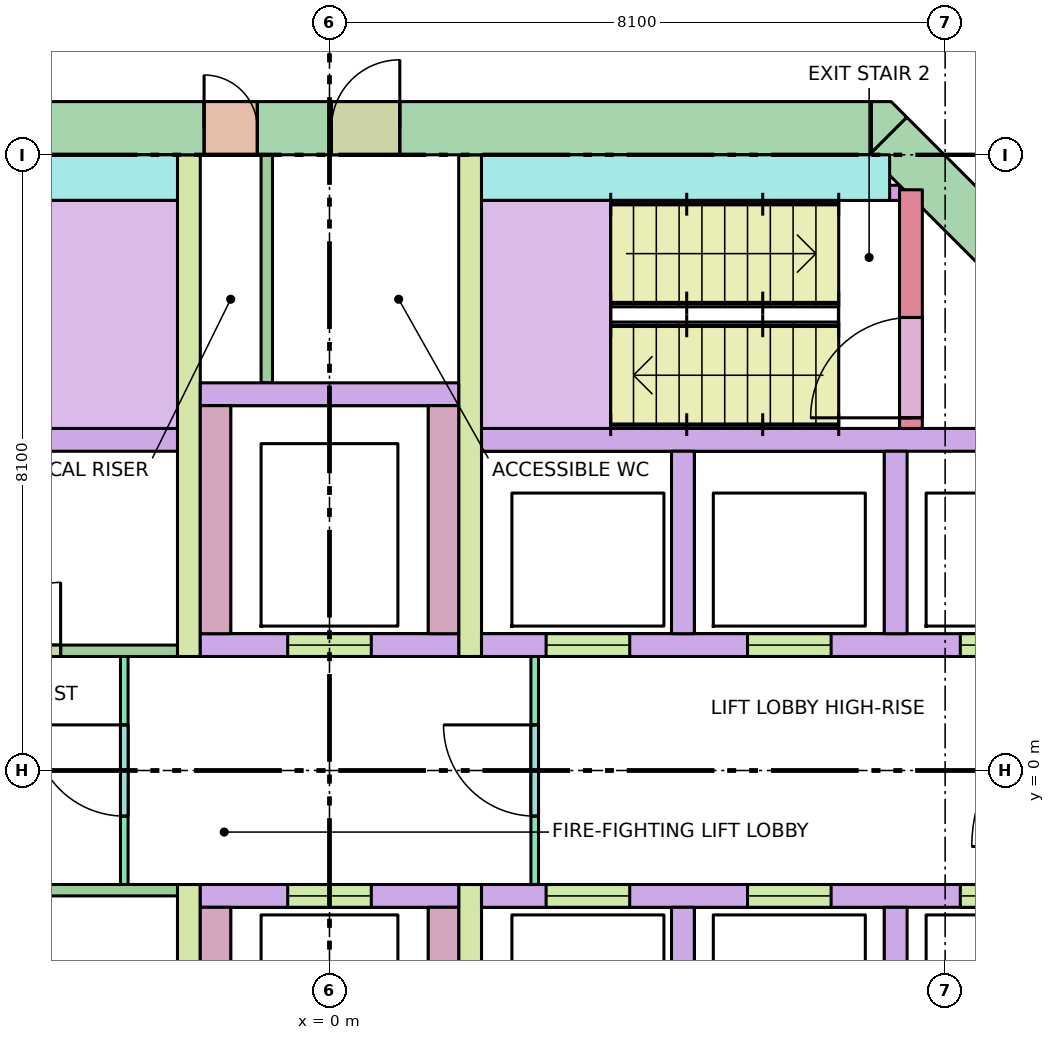
"""IFC4 building model, lengths in metres.
Left out: names, types, materials, properties, quantities, classifications, styles, units other than length and angle.
Written with IfcOpenShell. Run it as: python <this file> out.ifc"""

import sys

from ifc_helpers import new_model, si_unit, direction, frame, frame_2d, origin, place, context, subcontext, project, spatial, polyline, rectangle, outline, extrude, element, fill, save


model = new_model("IFC4")
c1 = context("Model", 3, precision=1e-05, world=origin(), true_north=direction((0.0, 1.0)))
c2 = subcontext(c1, "Body", "Model", "MODEL_VIEW")
j1 = project(units=[si_unit("LENGTHUNIT", "METRE"), si_unit("PLANEANGLEUNIT", "RADIAN")], contexts=[c1])
p1 = place(None, origin())
s1 = spatial("IfcSite", under=j1, at=p1, CompositionType="ELEMENT")
p2 = place(p1, origin())
s2 = spatial("IfcBuilding", under=s1, at=p2, CompositionType="ELEMENT")
p3 = place(p2, frame((0.0, 0.0, 237.2)))
s3 = spatial("IfcBuildingStorey", under=s2, at=p3, CompositionType="ELEMENT", Elevation=237.2)
p4 = place(p3, frame((-7.13, 8.45, -0.28), z_axis=(0.0, 0.0, 1.0), x_axis=(1.0, 0.0, 0.0)))
e1 = element("IfcWall", 1, at=p4, inside=s3, PredefinedType="SHEAR", context=c2, shape_type="SweptSolid", body=[
    extrude(rectangle(XDim=14.26, YDim=0.7, at=frame_2d((7.13, 0.0))), origin(), (0.0, 0.0, 1.0), 3.7),
])
p5 = place(p4, frame((5.48, 0.0, 0.28)))
e2 = element("IfcOpeningElement", 2, at=p5, cuts=e1, PredefinedType="OPENING", context=c2, shape_type="SweptSolid", body=[
    extrude(rectangle(XDim=0.7, YDim=2.1, at=frame_2d((0.35, 1.05))), frame((0.0, 0.36, 0.0), z_axis=(0.0, -1.0, 0.0), x_axis=(1.0, 0.0, 0.0)), (0.0, 0.0, 1.0), 0.72),
])
p6 = place(p4, frame((7.155, 0.0, 0.28)))
e3 = element("IfcOpeningElement", 3, at=p6, cuts=e1, PredefinedType="OPENING", context=c2, shape_type="SweptSolid", body=[
    extrude(rectangle(XDim=0.9, YDim=2.1, at=frame_2d((0.45, 1.05))), frame((0.0, 0.36, 0.0), z_axis=(0.0, -1.0, 0.0), x_axis=(1.0, 0.0, 0.0)), (0.0, 0.0, 1.0), 0.72),
])
p7 = place(p3, frame((7.347, 8.347, -0.28), z_axis=(0.0, 0.0, 1.0), x_axis=(0.707106781187, -0.707106781187, 0.0)))
e4 = element("IfcWall", 4, at=p7, inside=s3, PredefinedType="SHEAR", context=c2, shape_type="SweptSolid", body=[
    extrude(rectangle(XDim=4.243, YDim=0.7, at=frame_2d((2.121, 0.0))), origin(), (0.0, 0.0, 1.0), 3.7),
])
p8 = place(p7, frame((2.393, 0.0, 0.28)))
e5 = element("IfcOpeningElement", 5, at=p8, cuts=e4, PredefinedType="OPENING", context=c2, shape_type="SweptSolid", body=[
    extrude(rectangle(XDim=1.2, YDim=2.1, at=frame_2d((0.6, 1.05))), frame((0.0, 0.36, 0.0), z_axis=(0.0, -1.0, 0.0), x_axis=(1.0, 0.0, 0.0)), (0.0, 0.0, 1.0), 0.72),
])
p9 = place(p3, frame((0.0, 0.0, -0.28)))
e6 = element("IfcWall", 6, at=p9, inside=s3, PredefinedType="SHEAR", context=c2, shape_type="SweptSolid", body=[
    extrude(outline(polyline([(7.39, 8.8), (7.595, 8.595), (7.595, 8.595), (7.595, 8.595), (7.13, 8.13), (7.13, 8.8), (7.13, 8.8), (7.39, 8.8)])), origin(), (0.0, 0.0, 1.0), 3.7),
])
for number, where, z_axis, x_axis in (
    (7, (-10.1, 4.35, 0.0), (0.0, 0.0, 1.0), (1.0, 0.0, 0.0)),
    (8, (2.0, 4.35, 0.0), (0.0, 0.0, 1.0), (1.0, 0.0, 0.0)),
):
    element("IfcWall", number, at=place(p3, frame(where, z_axis=z_axis, x_axis=x_axis)), inside=s3, PredefinedType="SOLIDWALL", context=c2, shape_type="SweptSolid", body=[
        extrude(rectangle(XDim=8.1, YDim=0.3, at=frame_2d((4.05, 0.0))), origin(), (0.0, 0.0, 1.0), 3.42),
    ])
p10 = place(p3, frame((2.0, 1.65, 0.0), z_axis=(0.0, 0.0, 1.0), x_axis=(1.0, 0.0, 0.0)))
e9 = element("IfcWall", 9, at=p10, inside=s3, PredefinedType="SOLIDWALL", context=c2, shape_type="SweptSolid", body=[
    extrude(rectangle(XDim=8.1, YDim=0.3, at=frame_2d((4.05, 0.0))), origin(), (0.0, 0.0, 1.0), 3.42),
])
p11 = place(p10, frame((0.85, 0.0, 0.0)))
e10 = element("IfcOpeningElement", 10, at=p11, cuts=e9, PredefinedType="OPENING", context=c2, shape_type="SweptSolid", body=[
    extrude(rectangle(XDim=1.1, YDim=2.1, at=frame_2d((0.55, 1.05))), frame((0.0, 0.16, 0.0), z_axis=(0.0, -1.0, 0.0), x_axis=(1.0, 0.0, 0.0)), (0.0, 0.0, 1.0), 0.32),
])
p12 = place(p10, frame((3.5, 0.0, 0.0)))
e11 = element("IfcOpeningElement", 11, at=p12, cuts=e9, PredefinedType="OPENING", context=c2, shape_type="SweptSolid", body=[
    extrude(rectangle(XDim=1.1, YDim=2.1, at=frame_2d((0.55, 1.05))), frame((0.0, 0.16, 0.0), z_axis=(0.0, -1.0, 0.0), x_axis=(1.0, 0.0, 0.0)), (0.0, 0.0, 1.0), 0.32),
])
p13 = place(p10, frame((6.3, 0.0, 0.0)))
e12 = element("IfcOpeningElement", 12, at=p13, cuts=e9, PredefinedType="OPENING", context=c2, shape_type="SweptSolid", body=[
    extrude(rectangle(XDim=1.1, YDim=2.1, at=frame_2d((0.55, 1.05))), frame((0.0, 0.16, 0.0), z_axis=(0.0, -1.0, 0.0), x_axis=(1.0, 0.0, 0.0)), (0.0, 0.0, 1.0), 0.32),
])
p14 = place(p3, frame((2.0, -1.65, 0.0), z_axis=(0.0, 0.0, 1.0), x_axis=(1.0, 0.0, 0.0)))
e13 = element("IfcWall", 13, at=p14, inside=s3, PredefinedType="SOLIDWALL", context=c2, shape_type="SweptSolid", body=[
    extrude(rectangle(XDim=8.1, YDim=0.3, at=frame_2d((4.05, 0.0))), origin(), (0.0, 0.0, 1.0), 3.42),
])
p15 = place(p14, frame((0.85, 0.0, 0.0)))
e14 = element("IfcOpeningElement", 14, at=p15, cuts=e13, PredefinedType="OPENING", context=c2, shape_type="SweptSolid", body=[
    extrude(rectangle(XDim=1.1, YDim=2.1, at=frame_2d((0.55, 1.05))), frame((0.0, 0.16, 0.0), z_axis=(0.0, -1.0, 0.0), x_axis=(1.0, 0.0, 0.0)), (0.0, 0.0, 1.0), 0.32),
])
p16 = place(p14, frame((3.5, 0.0, 0.0)))
e15 = element("IfcOpeningElement", 15, at=p16, cuts=e13, PredefinedType="OPENING", context=c2, shape_type="SweptSolid", body=[
    extrude(rectangle(XDim=1.1, YDim=2.1, at=frame_2d((0.55, 1.05))), frame((0.0, 0.16, 0.0), z_axis=(0.0, -1.0, 0.0), x_axis=(1.0, 0.0, 0.0)), (0.0, 0.0, 1.0), 0.32),
])
p17 = place(p14, frame((6.3, 0.0, 0.0)))
e16 = element("IfcOpeningElement", 16, at=p17, cuts=e13, PredefinedType="OPENING", context=c2, shape_type="SweptSolid", body=[
    extrude(rectangle(XDim=1.1, YDim=2.1, at=frame_2d((0.55, 1.05))), frame((0.0, 0.16, 0.0), z_axis=(0.0, -1.0, 0.0), x_axis=(1.0, 0.0, 0.0)), (0.0, 0.0, 1.0), 0.32),
])
for number, where, z_axis, x_axis in (
    (17, (4.65, 1.8, 0.0), (0.0, 0.0, 1.0), (0.0, 1.0, 0.0)),
    (18, (4.65, -4.2, 0.0), (0.0, 0.0, 1.0), (0.0, 1.0, 0.0)),
    (19, (7.45, 1.8, 0.0), (0.0, 0.0, 1.0), (0.0, 1.0, 0.0)),
    (20, (7.45, -4.2, 0.0), (0.0, 0.0, 1.0), (0.0, 1.0, 0.0)),
):
    element("IfcWall", number, at=place(p3, frame(where, z_axis=z_axis, x_axis=x_axis)), inside=s3, PredefinedType="SOLIDWALL", context=c2, shape_type="SweptSolid", body=[
        extrude(rectangle(XDim=2.4, YDim=0.3, at=frame_2d((1.2, 0.0))), origin(), (0.0, 0.0, 1.0), 3.42),
    ])
for number, where, z_axis, x_axis in (
    (21, (-1.85, 1.5, 0.0), (0.0, 0.0, 1.0), (0.0, 1.0, 0.0)),
    (22, (-1.85, -8.1, 0.0), (0.0, 0.0, 1.0), (0.0, 1.0, 0.0)),
    (23, (1.85, 1.5, 0.0), (0.0, 0.0, 1.0), (0.0, 1.0, 0.0)),
    (24, (1.85, -8.1, 0.0), (0.0, 0.0, 1.0), (0.0, 1.0, 0.0)),
):
    element("IfcWall", number, at=place(p3, frame(where, z_axis=z_axis, x_axis=x_axis)), inside=s3, PredefinedType="SHEAR", context=c2, shape_type="SweptSolid", body=[
        extrude(rectangle(XDim=6.6, YDim=0.3, at=frame_2d((3.3, 0.0))), origin(), (0.0, 0.0, 1.0), 3.42),
    ])
p18 = place(p3, frame((-1.7, 1.65, 0.0), z_axis=(0.0, 0.0, 1.0), x_axis=(1.0, 0.0, 0.0)))
e25 = element("IfcWall", 25, at=p18, inside=s3, PredefinedType="SOLIDWALL", context=c2, shape_type="SweptSolid", body=[
    extrude(rectangle(XDim=3.4, YDim=0.3, at=frame_2d((1.7, 0.0))), origin(), (0.0, 0.0, 1.0), 3.42),
])
p19 = place(p18, frame((1.15, 0.0, 0.0)))
e26 = element("IfcOpeningElement", 26, at=p19, cuts=e25, PredefinedType="OPENING", context=c2, shape_type="SweptSolid", body=[
    extrude(rectangle(XDim=1.1, YDim=2.1, at=frame_2d((0.55, 1.05))), frame((0.0, 0.16, 0.0), z_axis=(0.0, -1.0, 0.0), x_axis=(1.0, 0.0, 0.0)), (0.0, 0.0, 1.0), 0.32),
])
p20 = place(p3, frame((-1.7, -1.65, 0.0), z_axis=(0.0, 0.0, 1.0), x_axis=(1.0, 0.0, 0.0)))
e27 = element("IfcWall", 27, at=p20, inside=s3, PredefinedType="SOLIDWALL", context=c2, shape_type="SweptSolid", body=[
    extrude(rectangle(XDim=3.4, YDim=0.3, at=frame_2d((1.7, 0.0))), origin(), (0.0, 0.0, 1.0), 3.42),
])
p21 = place(p20, frame((1.15, 0.0, 0.0)))
e28 = element("IfcOpeningElement", 28, at=p21, cuts=e27, PredefinedType="OPENING", context=c2, shape_type="SweptSolid", body=[
    extrude(rectangle(XDim=1.1, YDim=2.1, at=frame_2d((0.55, 1.05))), frame((0.0, 0.16, 0.0), z_axis=(0.0, -1.0, 0.0), x_axis=(1.0, 0.0, 0.0)), (0.0, 0.0, 1.0), 0.32),
])
for number, where, z_axis, x_axis in (
    (29, (-1.5, 1.8, 0.0), (0.0, 0.0, 1.0), (0.0, 1.0, 0.0)),
    (30, (-1.5, -4.8, 0.0), (0.0, 0.0, 1.0), (0.0, 1.0, 0.0)),
    (31, (1.5, 1.8, 0.0), (0.0, 0.0, 1.0), (0.0, 1.0, 0.0)),
    (32, (1.5, -4.8, 0.0), (0.0, 0.0, 1.0), (0.0, 1.0, 0.0)),
):
    element("IfcWall", number, at=place(p3, frame(where, z_axis=z_axis, x_axis=x_axis)), inside=s3, PredefinedType="SOLIDWALL", context=c2, shape_type="SweptSolid", body=[
        extrude(rectangle(XDim=3.0, YDim=0.4, at=frame_2d((1.5, 0.0))), origin(), (0.0, 0.0, 1.0), 3.42),
    ])
p22 = place(p3, frame((-1.7, 4.95, 0.0), z_axis=(0.0, 0.0, 1.0), x_axis=(1.0, 0.0, 0.0)))
e33 = element("IfcWall", 33, at=p22, inside=s3, PredefinedType="SOLIDWALL", context=c2, shape_type="SweptSolid", body=[
    extrude(rectangle(XDim=3.4, YDim=0.3, at=frame_2d((1.7, 0.0))), origin(), (0.0, 0.0, 1.0), 3.42),
])
p23 = place(p3, frame((-7.37, 7.8, 0.0), z_axis=(0.0, 0.0, 1.0), x_axis=(1.0, 0.0, 0.0)))
e34 = element("IfcWall", 34, at=p23, inside=s3, PredefinedType="SHEAR", context=c2, shape_type="SweptSolid", body=[
    extrude(rectangle(XDim=5.37, YDim=0.6, at=frame_2d((2.685, 0.0))), origin(), (0.0, 0.0, 1.0), 3.42),
])
p24 = place(p3, frame((7.65, 4.5, 0.0), z_axis=(0.0, 0.0, 1.0), x_axis=(0.0, 1.0, 0.0)))
e35 = element("IfcWall", 35, at=p24, inside=s3, PredefinedType="SHEAR", context=c2, shape_type="SweptSolid", body=[
    extrude(rectangle(XDim=3.14, YDim=0.3, at=frame_2d((1.57, 0.0))), origin(), (0.0, 0.0, 1.0), 3.42),
])
p25 = place(p24, frame((0.14, 0.0, 0.0)))
e36 = element("IfcOpeningElement", 36, at=p25, cuts=e35, PredefinedType="OPENING", context=c2, shape_type="SweptSolid", body=[
    extrude(rectangle(XDim=1.32, YDim=2.1, at=frame_2d((0.66, 1.05))), frame((0.0, 0.16, 0.0), z_axis=(0.0, -1.0, 0.0), x_axis=(1.0, 0.0, 0.0)), (0.0, 0.0, 1.0), 0.32),
])
p26 = place(p3, frame((2.0, 7.8, 0.0), z_axis=(0.0, 0.0, 1.0), x_axis=(1.0, 0.0, 0.0)))
e37 = element("IfcWall", 37, at=p26, inside=s3, PredefinedType="SHEAR", context=c2, shape_type="SweptSolid", body=[
    extrude(rectangle(XDim=5.37, YDim=0.6, at=frame_2d((2.685, 0.0))), origin(), (0.0, 0.0, 1.0), 3.42),
])
p27 = place(p3, frame((6.9, 7.6, 0.0), z_axis=(0.0, 0.0, 1.0), x_axis=(1.0, 0.0, 0.0)))
e38 = element("IfcWall", 38, at=p27, inside=s3, PredefinedType="SHEAR", context=c2, shape_type="SweptSolid", body=[
    extrude(rectangle(XDim=0.6, YDim=0.2, at=frame_2d((0.3, 0.0))), origin(), (0.0, 0.0, 1.0), 3.42),
])
p28 = place(p3, frame((-2.7, -1.5, 0.0), z_axis=(0.0, 0.0, 1.0), x_axis=(0.0, 1.0, 0.0)))
e39 = element("IfcWall", 39, at=p28, inside=s3, PredefinedType="PARTITIONING", context=c2, shape_type="SweptSolid", body=[
    extrude(rectangle(XDim=3.0, YDim=0.1, at=frame_2d((1.5, 0.0))), origin(), (0.0, 0.0, 1.0), 3.42),
])
p29 = place(p28, frame((0.9, 0.0, 0.0)))
e40 = element("IfcOpeningElement", 40, at=p29, cuts=e39, PredefinedType="OPENING", context=c2, shape_type="SweptSolid", body=[
    extrude(rectangle(XDim=1.2, YDim=2.1, at=frame_2d((0.6, 1.05))), frame((0.0, 0.06, 0.0), z_axis=(0.0, -1.0, 0.0), x_axis=(1.0, 0.0, 0.0)), (0.0, 0.0, 1.0), 0.12),
])
p30 = place(p3, frame((2.7, -1.5, 0.0), z_axis=(0.0, 0.0, 1.0), x_axis=(0.0, 1.0, 0.0)))
e41 = element("IfcWall", 41, at=p30, inside=s3, PredefinedType="PARTITIONING", context=c2, shape_type="SweptSolid", body=[
    extrude(rectangle(XDim=3.0, YDim=0.1, at=frame_2d((1.5, 0.0))), origin(), (0.0, 0.0, 1.0), 3.42),
])
p31 = place(p30, frame((0.9, 0.0, 0.0)))
e42 = element("IfcOpeningElement", 42, at=p31, cuts=e41, PredefinedType="OPENING", context=c2, shape_type="SweptSolid", body=[
    extrude(rectangle(XDim=1.2, YDim=2.1, at=frame_2d((0.6, 1.05))), frame((0.0, 0.06, 0.0), z_axis=(0.0, -1.0, 0.0), x_axis=(1.0, 0.0, 0.0)), (0.0, 0.0, 1.0), 0.12),
])
p32 = place(p3, frame((-0.825, 5.1, 0.0), z_axis=(0.0, 0.0, 1.0), x_axis=(0.0, 1.0, 0.0)))
e43 = element("IfcWall", 43, at=p32, inside=s3, PredefinedType="PARTITIONING", context=c2, shape_type="SweptSolid", body=[
    extrude(rectangle(XDim=3.0, YDim=0.15, at=frame_2d((1.5, 0.0))), origin(), (0.0, 0.0, 1.0), 3.42),
])
p33 = place(p3, frame((-10.1, 1.575, 0.0), z_axis=(0.0, 0.0, 1.0), x_axis=(1.0, 0.0, 0.0)))
e44 = element("IfcWall", 44, at=p33, inside=s3, PredefinedType="PARTITIONING", context=c2, shape_type="SweptSolid", body=[
    extrude(rectangle(XDim=8.1, YDim=0.15, at=frame_2d((4.05, 0.0))), origin(), (0.0, 0.0, 1.0), 3.42),
])
p34 = place(p33, frame((1.538, 0.0, 0.0)))
e45 = element("IfcOpeningElement", 45, at=p34, cuts=e44, PredefinedType="OPENING", context=c2, shape_type="SweptSolid", body=[
    extrude(rectangle(XDim=0.9, YDim=2.1, at=frame_2d((0.45, 1.05))), frame((0.0, 0.085, 0.0), z_axis=(0.0, -1.0, 0.0), x_axis=(1.0, 0.0, 0.0)), (0.0, 0.0, 1.0), 0.17),
])
p35 = place(p33, frame((5.663, 0.0, 0.0)))
e46 = element("IfcOpeningElement", 46, at=p35, cuts=e44, PredefinedType="OPENING", context=c2, shape_type="SweptSolid", body=[
    extrude(rectangle(XDim=0.9, YDim=2.1, at=frame_2d((0.45, 1.05))), frame((0.0, 0.085, 0.0), z_axis=(0.0, -1.0, 0.0), x_axis=(1.0, 0.0, 0.0)), (0.0, 0.0, 1.0), 0.17),
])
p36 = place(p3, frame((-10.1, -1.575, 0.0), z_axis=(0.0, 0.0, 1.0), x_axis=(1.0, 0.0, 0.0)))
e47 = element("IfcWall", 47, at=p36, inside=s3, PredefinedType="PARTITIONING", context=c2, shape_type="SweptSolid", body=[
    extrude(rectangle(XDim=8.1, YDim=0.15, at=frame_2d((4.05, 0.0))), origin(), (0.0, 0.0, 1.0), 3.42),
])
p37 = place(p36, frame((0.33, 0.0, 0.0)))
e48 = element("IfcOpeningElement", 48, at=p37, cuts=e47, PredefinedType="OPENING", context=c2, shape_type="SweptSolid", body=[
    extrude(rectangle(XDim=0.9, YDim=2.1, at=frame_2d((0.45, 1.05))), frame((0.0, 0.085, 0.0), z_axis=(0.0, -1.0, 0.0), x_axis=(1.0, 0.0, 0.0)), (0.0, 0.0, 1.0), 0.17),
])
p38 = place(p36, frame((2.04, 0.0, 0.0)))
e49 = element("IfcOpeningElement", 49, at=p38, cuts=e47, PredefinedType="OPENING", context=c2, shape_type="SweptSolid", body=[
    extrude(rectangle(XDim=0.9, YDim=2.1, at=frame_2d((0.45, 1.05))), frame((0.0, 0.085, 0.0), z_axis=(0.0, -1.0, 0.0), x_axis=(1.0, 0.0, 0.0)), (0.0, 0.0, 1.0), 0.17),
])
p39 = place(p36, frame((5.31, 0.0, 0.0)))
e50 = element("IfcOpeningElement", 50, at=p39, cuts=e47, PredefinedType="OPENING", context=c2, shape_type="SweptSolid", body=[
    extrude(rectangle(XDim=0.9, YDim=2.1, at=frame_2d((0.45, 1.05))), frame((0.0, 0.085, 0.0), z_axis=(0.0, -1.0, 0.0), x_axis=(1.0, 0.0, 0.0)), (0.0, 0.0, 1.0), 0.17),
])
p40 = place(p3, frame((8.204, 10.638, 0.0), z_axis=(0.0, 0.0, 1.0), x_axis=(0.707106781187, -0.707106781187, 0.0)))
e51 = element("IfcWall", 51, at=p40, inside=s3, PredefinedType="PARTITIONING", context=c2, shape_type="SweptSolid", body=[
    extrude(rectangle(XDim=6.271, YDim=0.15, at=frame_2d((3.135, 0.0))), origin(), (0.0, 0.0, 1.0), 2.57),
])
p41 = place(p40, frame((0.436, 0.0, 0.0)))
e52 = element("IfcOpeningElement", 52, at=p41, cuts=e51, PredefinedType="OPENING", context=c2, shape_type="SweptSolid", body=[
    extrude(rectangle(XDim=0.9, YDim=2.1, at=frame_2d((0.45, 1.05))), frame((0.0, 0.085, 0.0), z_axis=(0.0, -1.0, 0.0), x_axis=(1.0, 0.0, 0.0)), (0.0, 0.0, 1.0), 0.17),
])
p42 = place(p11, origin())
e53 = element("IfcDoor", 53, at=p42, inside=s3, OperationType="DOUBLE_DOOR_SLIDING", PredefinedType="DOOR", context=c2, shape_type="SweptSolid", body=[
    extrude(rectangle(XDim=1.1, YDim=2.1, at=frame_2d((0.55, 1.05))), frame((0.0, 0.025, 0.0), z_axis=(0.0, -1.0, 0.0), x_axis=(1.0, 0.0, 0.0)), (0.0, 0.0, 1.0), 0.05),
])
fill(e10, e53)
p43 = place(p12, origin())
e54 = element("IfcDoor", 54, at=p43, inside=s3, OperationType="DOUBLE_DOOR_SLIDING", PredefinedType="DOOR", context=c2, shape_type="SweptSolid", body=[
    extrude(rectangle(XDim=1.1, YDim=2.1, at=frame_2d((0.55, 1.05))), frame((0.0, 0.025, 0.0), z_axis=(0.0, -1.0, 0.0), x_axis=(1.0, 0.0, 0.0)), (0.0, 0.0, 1.0), 0.05),
])
fill(e11, e54)
p44 = place(p13, origin())
e55 = element("IfcDoor", 55, at=p44, inside=s3, OperationType="DOUBLE_DOOR_SLIDING", PredefinedType="DOOR", context=c2, shape_type="SweptSolid", body=[
    extrude(rectangle(XDim=1.1, YDim=2.1, at=frame_2d((0.55, 1.05))), frame((0.0, 0.025, 0.0), z_axis=(0.0, -1.0, 0.0), x_axis=(1.0, 0.0, 0.0)), (0.0, 0.0, 1.0), 0.05),
])
fill(e12, e55)
p45 = place(p15, origin())
e56 = element("IfcDoor", 56, at=p45, inside=s3, OperationType="DOUBLE_DOOR_SLIDING", PredefinedType="DOOR", context=c2, shape_type="SweptSolid", body=[
    extrude(rectangle(XDim=1.1, YDim=2.1, at=frame_2d((0.55, 1.05))), frame((0.0, 0.025, 0.0), z_axis=(0.0, -1.0, 0.0), x_axis=(1.0, 0.0, 0.0)), (0.0, 0.0, 1.0), 0.05),
])
fill(e14, e56)
p46 = place(p16, origin())
e57 = element("IfcDoor", 57, at=p46, inside=s3, OperationType="DOUBLE_DOOR_SLIDING", PredefinedType="DOOR", context=c2, shape_type="SweptSolid", body=[
    extrude(rectangle(XDim=1.1, YDim=2.1, at=frame_2d((0.55, 1.05))), frame((0.0, 0.025, 0.0), z_axis=(0.0, -1.0, 0.0), x_axis=(1.0, 0.0, 0.0)), (0.0, 0.0, 1.0), 0.05),
])
fill(e15, e57)
p47 = place(p17, origin())
e58 = element("IfcDoor", 58, at=p47, inside=s3, OperationType="DOUBLE_DOOR_SLIDING", PredefinedType="DOOR", context=c2, shape_type="SweptSolid", body=[
    extrude(rectangle(XDim=1.1, YDim=2.1, at=frame_2d((0.55, 1.05))), frame((0.0, 0.025, 0.0), z_axis=(0.0, -1.0, 0.0), x_axis=(1.0, 0.0, 0.0)), (0.0, 0.0, 1.0), 0.05),
])
fill(e16, e58)
p48 = place(p19, origin())
e59 = element("IfcDoor", 59, at=p48, inside=s3, OperationType="DOUBLE_DOOR_SLIDING", PredefinedType="DOOR", context=c2, shape_type="SweptSolid", body=[
    extrude(rectangle(XDim=1.1, YDim=2.1, at=frame_2d((0.55, 1.05))), frame((0.0, 0.025, 0.0), z_axis=(0.0, -1.0, 0.0), x_axis=(1.0, 0.0, 0.0)), (0.0, 0.0, 1.0), 0.05),
])
fill(e26, e59)
p49 = place(p21, origin())
e60 = element("IfcDoor", 60, at=p49, inside=s3, OperationType="DOUBLE_DOOR_SLIDING", PredefinedType="DOOR", context=c2, shape_type="SweptSolid", body=[
    extrude(rectangle(XDim=1.1, YDim=2.1, at=frame_2d((0.55, 1.05))), frame((0.0, 0.025, 0.0), z_axis=(0.0, -1.0, 0.0), x_axis=(1.0, 0.0, 0.0)), (0.0, 0.0, 1.0), 0.05),
])
fill(e28, e60)
p50 = place(p25, origin())
e61 = element("IfcDoor", 61, at=p50, inside=s3, OperationType="DOUBLE_DOOR_SINGLE_SWING", PredefinedType="DOOR", context=c2, shape_type="SweptSolid", body=[
    extrude(rectangle(XDim=1.32, YDim=2.1, at=frame_2d((0.66, 1.05))), frame((0.0, 0.025, 0.0), z_axis=(0.0, -1.0, 0.0), x_axis=(1.0, 0.0, 0.0)), (0.0, 0.0, 1.0), 0.05),
])
fill(e36, e61)
p51 = place(p29, origin())
e62 = element("IfcDoor", 62, at=p51, inside=s3, OperationType="SINGLE_SWING_RIGHT", PredefinedType="DOOR", context=c2, shape_type="SweptSolid", body=[
    extrude(rectangle(XDim=1.2, YDim=2.1, at=frame_2d((0.6, 1.05))), frame((0.0, 0.025, 0.0), z_axis=(0.0, -1.0, 0.0), x_axis=(1.0, 0.0, 0.0)), (0.0, 0.0, 1.0), 0.05),
])
fill(e40, e62)
p52 = place(p31, origin())
e63 = element("IfcDoor", 63, at=p52, inside=s3, OperationType="SINGLE_SWING_RIGHT", PredefinedType="DOOR", context=c2, shape_type="SweptSolid", body=[
    extrude(rectangle(XDim=1.2, YDim=2.1, at=frame_2d((0.6, 1.05))), frame((0.0, 0.025, 0.0), z_axis=(0.0, -1.0, 0.0), x_axis=(1.0, 0.0, 0.0)), (0.0, 0.0, 1.0), 0.05),
])
fill(e42, e63)
p53 = place(p5, origin())
e64 = element("IfcDoor", 64, at=p53, inside=s3, OperationType="SINGLE_SWING_LEFT", PredefinedType="DOOR", context=c2, shape_type="SweptSolid", body=[
    extrude(rectangle(XDim=0.7, YDim=2.1, at=frame_2d((0.35, 1.05))), frame((0.0, 0.025, 0.0), z_axis=(0.0, -1.0, 0.0), x_axis=(1.0, 0.0, 0.0)), (0.0, 0.0, 1.0), 0.05),
])
fill(e2, e64)
p54 = place(p6, origin())
e65 = element("IfcDoor", 65, at=p54, inside=s3, OperationType="SINGLE_SWING_RIGHT", PredefinedType="DOOR", context=c2, shape_type="SweptSolid", body=[
    extrude(rectangle(XDim=0.9, YDim=2.1, at=frame_2d((0.45, 1.05))), frame((0.0, 0.025, 0.0), z_axis=(0.0, -1.0, 0.0), x_axis=(1.0, 0.0, 0.0)), (0.0, 0.0, 1.0), 0.05),
])
fill(e3, e65)
p55 = place(p35, origin())
e66 = element("IfcDoor", 66, at=p55, inside=s3, OperationType="SINGLE_SWING_RIGHT", PredefinedType="DOOR", context=c2, shape_type="SweptSolid", body=[
    extrude(rectangle(XDim=0.9, YDim=2.1, at=frame_2d((0.45, 1.05))), frame((0.0, 0.025, 0.0), z_axis=(0.0, -1.0, 0.0), x_axis=(1.0, 0.0, 0.0)), (0.0, 0.0, 1.0), 0.05),
])
fill(e46, e66)
save(model, sys.argv[1])
